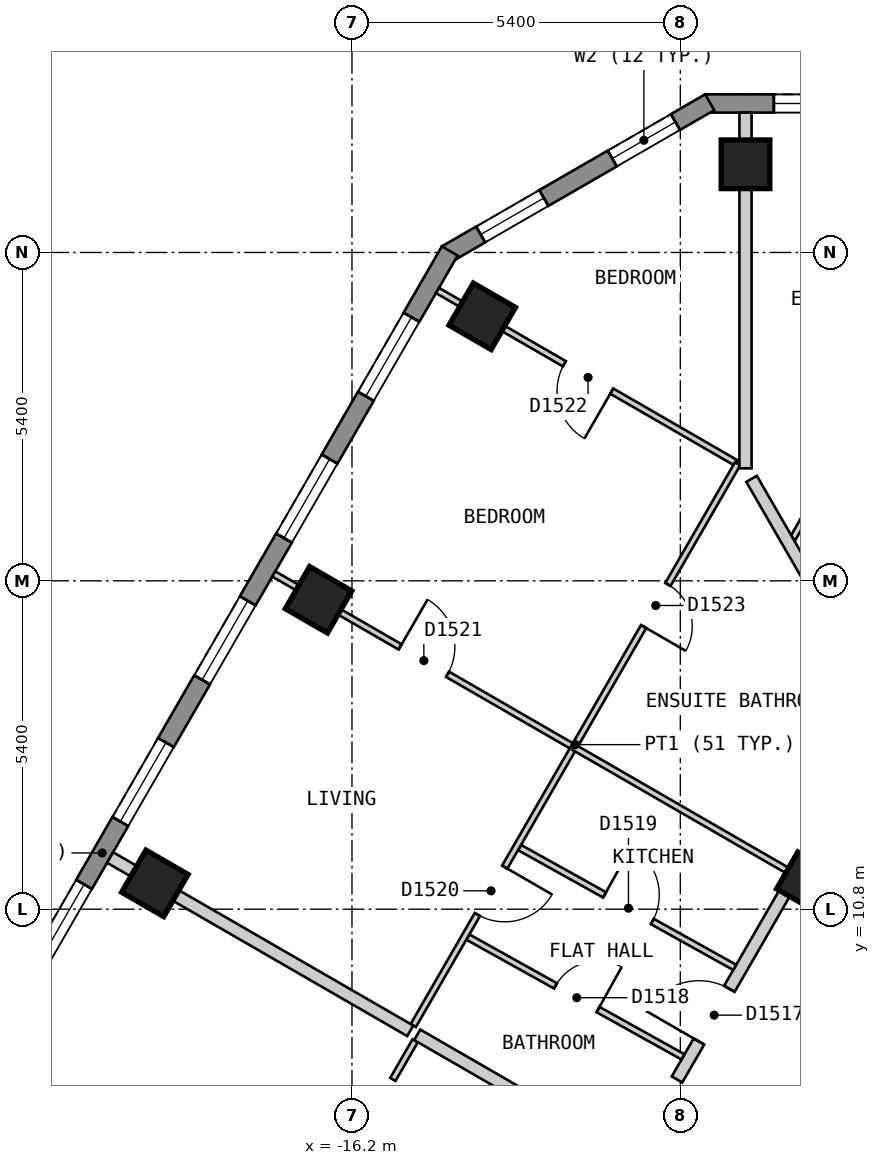
"""IFC4 building model, lengths in metres.
Left out: names, types, materials, properties, quantities, classifications, styles, units other than length and angle.
Written with IfcOpenShell. Run it as: python <this file> out.ifc"""

import sys

from ifc_helpers import new_model, si_unit, direction, frame, frame_2d, origin, origin_2d, place, context, subcontext, project, spatial, polyline, rectangle, outline, extrude, element, fill, save


model = new_model("IFC4")
c1 = context("Model", 3, precision=1e-05, world=origin(), true_north=direction((0.0, 1.0)))
c2 = subcontext(c1, "Body", "Model", "MODEL_VIEW")
j1 = project(units=[si_unit("LENGTHUNIT", "METRE"), si_unit("PLANEANGLEUNIT", "RADIAN")], contexts=[c1])
p1 = place(None, origin())
s1 = spatial("IfcSite", under=j1, at=p1, CompositionType="ELEMENT")
p2 = place(p1, origin())
s2 = spatial("IfcBuilding", under=s1, at=p2, CompositionType="ELEMENT")
p3 = place(p2, frame((0.0, 0.0, 184.2)))
s3 = spatial("IfcBuildingStorey", under=s2, at=p3, CompositionType="ELEMENT", Elevation=184.2)
for number, where, z_axis, x_axis in (
    (1, (-9.728, 23.05, 0.0), (0.0, 0.0, 1.0), (-1.0, 0.0, 0.0)),
    (2, (-14.058, 20.55, 0.0), (0.0, 0.0, 1.0), (-0.5, -0.866, 0.0)),
    (3, (-16.75, 15.888, 0.0), (0.0, 0.0, 1.0), (-0.5, -0.866, 0.0)),
    (4, (-19.442, 11.225, 0.0), (0.0, 0.0, 1.0), (-0.5, -0.866, 0.0)),
):
    element("IfcColumn", number, at=place(p3, frame(where, z_axis=z_axis, x_axis=x_axis)), inside=s3, PredefinedType="COLUMN", context=c2, shape_type="SweptSolid", body=[
        extrude(rectangle(XDim=0.8, YDim=0.8, at=origin_2d()), origin(), (0.0, 0.0, 1.0), 3.0),
    ])
p4 = place(p3, frame((-8.739, 11.263, 0.0), z_axis=(0.0, 0.0, 1.0), x_axis=(-0.5, -0.866025403784, 0.0)))
e5 = element("IfcColumn", 5, at=p4, inside=s3, PredefinedType="COLUMN", context=c2, shape_type="SweptSolid", body=[
    extrude(rectangle(XDim=0.7, YDim=0.7, at=origin_2d()), origin(), (0.0, 0.0, 1.0), 3.0),
])
p5 = place(p3, frame((10.392, 24.05, 0.0), z_axis=(0.0, 0.0, 1.0), x_axis=(-1.0, 0.0, 0.0)))
e6 = element("IfcWall", 6, at=p5, inside=s3, PredefinedType="SOLIDWALL", context=c2, shape_type="SweptSolid", body=[
    extrude(outline(polyline([(0.0, -0.15), (20.784, -0.15), (20.704, 0.15), (0.08, 0.15), (0.0, -0.15)])), origin(), (0.0, 0.0, 1.0), 2.7),
])
p6 = place(p5, frame((1.13, 0.0, 0.15)))
e7 = element("IfcOpeningElement", 7, at=p6, cuts=e6, PredefinedType="OPENING", context=c2, shape_type="SweptSolid", body=[
    extrude(rectangle(XDim=1.5, YDim=2.1, at=frame_2d((0.75, 1.05))), frame((0.0, 0.16, 0.0), z_axis=(0.0, -1.0, 0.0), x_axis=(1.0, 0.0, 0.0)), (0.0, 0.0, 1.0), 0.32),
])
p7 = place(p5, frame((3.562, 0.0, 0.15)))
e8 = element("IfcOpeningElement", 8, at=p7, cuts=e6, PredefinedType="OPENING", context=c2, shape_type="SweptSolid", body=[
    extrude(rectangle(XDim=1.5, YDim=2.1, at=frame_2d((0.75, 1.05))), frame((0.0, 0.16, 0.0), z_axis=(0.0, -1.0, 0.0), x_axis=(1.0, 0.0, 0.0)), (0.0, 0.0, 1.0), 0.32),
])
p8 = place(p5, frame((5.994, 0.0, 0.15)))
e9 = element("IfcOpeningElement", 9, at=p8, cuts=e6, PredefinedType="OPENING", context=c2, shape_type="SweptSolid", body=[
    extrude(rectangle(XDim=1.5, YDim=2.1, at=frame_2d((0.75, 1.05))), frame((0.0, 0.16, 0.0), z_axis=(0.0, -1.0, 0.0), x_axis=(1.0, 0.0, 0.0)), (0.0, 0.0, 1.0), 0.32),
])
p9 = place(p5, frame((8.426, 0.0, 0.15)))
e10 = element("IfcOpeningElement", 10, at=p9, cuts=e6, PredefinedType="OPENING", context=c2, shape_type="SweptSolid", body=[
    extrude(rectangle(XDim=1.5, YDim=2.1, at=frame_2d((0.75, 1.05))), frame((0.0, 0.16, 0.0), z_axis=(0.0, -1.0, 0.0), x_axis=(1.0, 0.0, 0.0)), (0.0, 0.0, 1.0), 0.32),
])
p10 = place(p5, frame((10.858, 0.0, 0.15)))
e11 = element("IfcOpeningElement", 11, at=p10, cuts=e6, PredefinedType="OPENING", context=c2, shape_type="SweptSolid", body=[
    extrude(rectangle(XDim=1.5, YDim=2.1, at=frame_2d((0.75, 1.05))), frame((0.0, 0.16, 0.0), z_axis=(0.0, -1.0, 0.0), x_axis=(1.0, 0.0, 0.0)), (0.0, 0.0, 1.0), 0.32),
])
p11 = place(p5, frame((13.29, 0.0, 0.15)))
e12 = element("IfcOpeningElement", 12, at=p11, cuts=e6, PredefinedType="OPENING", context=c2, shape_type="SweptSolid", body=[
    extrude(rectangle(XDim=1.5, YDim=2.1, at=frame_2d((0.75, 1.05))), frame((0.0, 0.16, 0.0), z_axis=(0.0, -1.0, 0.0), x_axis=(1.0, 0.0, 0.0)), (0.0, 0.0, 1.0), 0.32),
])
p12 = place(p5, frame((15.722, 0.0, 0.15)))
e13 = element("IfcOpeningElement", 13, at=p12, cuts=e6, PredefinedType="OPENING", context=c2, shape_type="SweptSolid", body=[
    extrude(rectangle(XDim=1.5, YDim=2.1, at=frame_2d((0.75, 1.05))), frame((0.0, 0.16, 0.0), z_axis=(0.0, -1.0, 0.0), x_axis=(1.0, 0.0, 0.0)), (0.0, 0.0, 1.0), 0.32),
])
p13 = place(p5, frame((18.154, 0.0, 0.15)))
e14 = element("IfcOpeningElement", 14, at=p13, cuts=e6, PredefinedType="OPENING", context=c2, shape_type="SweptSolid", body=[
    extrude(rectangle(XDim=1.5, YDim=2.1, at=frame_2d((0.75, 1.05))), frame((0.0, 0.16, 0.0), z_axis=(0.0, -1.0, 0.0), x_axis=(1.0, 0.0, 0.0)), (0.0, 0.0, 1.0), 0.32),
])
p14 = place(p3, frame((-10.317, 24.07, 0.0), z_axis=(0.0, 0.0, 1.0), x_axis=(-0.866022959057, -0.500004234368, 0.0)))
e15 = element("IfcWall", 15, at=p14, inside=s3, PredefinedType="SOLIDWALL", context=c2, shape_type="SweptSolid", body=[
    extrude(outline(polyline([(0.0, -0.15), (5.0, -0.15), (4.92, 0.15), (0.08, 0.15), (0.0, -0.15)])), origin(), (0.0, 0.0, 1.0), 2.7),
])
p15 = place(p14, frame((0.65, 0.0, 0.15)))
e16 = element("IfcOpeningElement", 16, at=p15, cuts=e15, PredefinedType="OPENING", context=c2, shape_type="SweptSolid", body=[
    extrude(rectangle(XDim=1.2, YDim=2.1, at=frame_2d((0.6, 1.05))), frame((0.0, 0.16, 0.0), z_axis=(0.0, -1.0, 0.0), x_axis=(1.0, 0.0, 0.0)), (0.0, 0.0, 1.0), 0.32),
])
p16 = place(p14, frame((3.149, 0.0, 0.15)))
e17 = element("IfcOpeningElement", 17, at=p16, cuts=e15, PredefinedType="OPENING", context=c2, shape_type="SweptSolid", body=[
    extrude(rectangle(XDim=1.2, YDim=2.1, at=frame_2d((0.6, 1.05))), frame((0.0, 0.16, 0.0), z_axis=(0.0, -1.0, 0.0), x_axis=(1.0, 0.0, 0.0)), (0.0, 0.0, 1.0), 0.32),
])
p17 = place(p3, frame((-14.592, 21.625, 0.0), z_axis=(0.0, 0.0, 1.0), x_axis=(-0.500010537973, -0.866019319597, 0.0)))
e18 = element("IfcWall", 18, at=p17, inside=s3, PredefinedType="SOLIDWALL", context=c2, shape_type="SweptSolid", body=[
    extrude(outline(polyline([(0.0, -0.15), (22.863, -0.15), (22.783, 0.15), (0.08, 0.15), (0.0, -0.15)])), origin(), (0.0, 0.0, 1.0), 2.7),
])
p18 = place(p17, frame((1.259, 0.0, 0.15)))
e19 = element("IfcOpeningElement", 19, at=p18, cuts=e18, PredefinedType="OPENING", context=c2, shape_type="SweptSolid", body=[
    extrude(rectangle(XDim=1.5, YDim=2.1, at=frame_2d((0.75, 1.05))), frame((0.0, 0.16, 0.0), z_axis=(0.0, -1.0, 0.0), x_axis=(1.0, 0.0, 0.0)), (0.0, 0.0, 1.0), 0.32),
])
p19 = place(p17, frame((3.952, 0.0, 0.15)))
e20 = element("IfcOpeningElement", 20, at=p19, cuts=e18, PredefinedType="OPENING", context=c2, shape_type="SweptSolid", body=[
    extrude(rectangle(XDim=1.5, YDim=2.1, at=frame_2d((0.75, 1.05))), frame((0.0, 0.16, 0.0), z_axis=(0.0, -1.0, 0.0), x_axis=(1.0, 0.0, 0.0)), (0.0, 0.0, 1.0), 0.32),
])
p20 = place(p17, frame((6.644, 0.0, 0.15)))
e21 = element("IfcOpeningElement", 21, at=p20, cuts=e18, PredefinedType="OPENING", context=c2, shape_type="SweptSolid", body=[
    extrude(rectangle(XDim=1.5, YDim=2.1, at=frame_2d((0.75, 1.05))), frame((0.0, 0.16, 0.0), z_axis=(0.0, -1.0, 0.0), x_axis=(1.0, 0.0, 0.0)), (0.0, 0.0, 1.0), 0.32),
])
p21 = place(p17, frame((9.335, 0.0, 0.15)))
e22 = element("IfcOpeningElement", 22, at=p21, cuts=e18, PredefinedType="OPENING", context=c2, shape_type="SweptSolid", body=[
    extrude(rectangle(XDim=1.5, YDim=2.1, at=frame_2d((0.75, 1.05))), frame((0.0, 0.16, 0.0), z_axis=(0.0, -1.0, 0.0), x_axis=(1.0, 0.0, 0.0)), (0.0, 0.0, 1.0), 0.32),
])
p22 = place(p17, frame((12.028, 0.0, 0.15)))
e23 = element("IfcOpeningElement", 23, at=p22, cuts=e18, PredefinedType="OPENING", context=c2, shape_type="SweptSolid", body=[
    extrude(rectangle(XDim=1.5, YDim=2.1, at=frame_2d((0.75, 1.05))), frame((0.0, 0.16, 0.0), z_axis=(0.0, -1.0, 0.0), x_axis=(1.0, 0.0, 0.0)), (0.0, 0.0, 1.0), 0.32),
])
p23 = place(p17, frame((14.72, 0.0, 0.15)))
e24 = element("IfcOpeningElement", 24, at=p23, cuts=e18, PredefinedType="OPENING", context=c2, shape_type="SweptSolid", body=[
    extrude(rectangle(XDim=1.5, YDim=2.1, at=frame_2d((0.75, 1.05))), frame((0.0, 0.16, 0.0), z_axis=(0.0, -1.0, 0.0), x_axis=(1.0, 0.0, 0.0)), (0.0, 0.0, 1.0), 0.32),
])
p24 = place(p17, frame((17.411, 0.0, 0.15)))
e25 = element("IfcOpeningElement", 25, at=p24, cuts=e18, PredefinedType="OPENING", context=c2, shape_type="SweptSolid", body=[
    extrude(rectangle(XDim=1.5, YDim=2.1, at=frame_2d((0.75, 1.05))), frame((0.0, 0.16, 0.0), z_axis=(0.0, -1.0, 0.0), x_axis=(1.0, 0.0, 0.0)), (0.0, 0.0, 1.0), 0.32),
])
p25 = place(p17, frame((20.104, 0.0, 0.15)))
e26 = element("IfcOpeningElement", 26, at=p25, cuts=e18, PredefinedType="OPENING", context=c2, shape_type="SweptSolid", body=[
    extrude(rectangle(XDim=1.5, YDim=2.1, at=frame_2d((0.75, 1.05))), frame((0.0, 0.16, 0.0), z_axis=(0.0, -1.0, 0.0), x_axis=(1.0, 0.0, 0.0)), (0.0, 0.0, 1.0), 0.32),
])
p26 = place(p3, frame((-10.854, 8.0, 0.0), z_axis=(0.0, 0.0, 1.0), x_axis=(0.499997637144, 0.866026767976, 0.0)))
e27 = element("IfcWall", 27, at=p26, inside=s3, PredefinedType="PARTITIONING", context=c2, shape_type="SweptSolid", body=[
    extrude(rectangle(XDim=10.854, YDim=0.2, at=frame_2d((5.427, 0.0))), origin(), (0.0, 0.0, 1.0), 2.7),
])
p27 = place(p26, frame((0.721, 0.0, 0.0)))
e28 = element("IfcOpeningElement", 28, at=p27, cuts=e27, PredefinedType="OPENING", context=c2, shape_type="SweptSolid", body=[
    extrude(rectangle(XDim=1.0, YDim=2.1, at=frame_2d((0.5, 1.05))), frame((0.0, 0.11, 0.0), z_axis=(0.0, -1.0, 0.0), x_axis=(1.0, 0.0, 0.0)), (0.0, 0.0, 1.0), 0.22),
])
p28 = place(p3, frame((-13.444, 11.814, 0.0), z_axis=(0.0, 0.0, 1.0), x_axis=(0.873653620945, -0.486548405207, 0.0)))
e29 = element("IfcWall", 29, at=p28, inside=s3, PredefinedType="PARTITIONING", context=c2, shape_type="SweptSolid", body=[
    extrude(rectangle(XDim=4.051, YDim=0.1, at=frame_2d((2.025, 0.0))), origin(), (0.0, 0.0, 1.0), 2.7),
])
p29 = place(p28, frame((1.6, 0.0, 0.0)))
e30 = element("IfcOpeningElement", 30, at=p29, cuts=e29, PredefinedType="OPENING", context=c2, shape_type="SweptSolid", body=[
    extrude(rectangle(XDim=0.9, YDim=2.1, at=frame_2d((0.45, 1.05))), frame((0.0, 0.06, 0.0), z_axis=(0.0, -1.0, 0.0), x_axis=(1.0, 0.0, 0.0)), (0.0, 0.0, 1.0), 0.12),
])
p30 = place(p3, frame((-14.294, 10.342, 0.0), z_axis=(0.0, 0.0, 1.0), x_axis=(0.873582256032, -0.486676527013, 0.0)))
e31 = element("IfcWall", 31, at=p30, inside=s3, PredefinedType="PARTITIONING", context=c2, shape_type="SweptSolid", body=[
    extrude(rectangle(XDim=4.05, YDim=0.1, at=frame_2d((2.025, 0.0))), origin(), (0.0, 0.0, 1.0), 2.7),
])
p31 = place(p30, frame((1.65, 0.0, 0.0)))
e32 = element("IfcOpeningElement", 32, at=p31, cuts=e31, PredefinedType="OPENING", context=c2, shape_type="SweptSolid", body=[
    extrude(rectangle(XDim=0.8, YDim=2.1, at=frame_2d((0.4, 1.05))), frame((0.0, 0.06, 0.0), z_axis=(0.0, -1.0, 0.0), x_axis=(1.0, 0.0, 0.0)), (0.0, 0.0, 1.0), 0.12),
])
p32 = place(p3, frame((-17.486, 16.313, 0.0), z_axis=(0.0, 0.0, 1.0), x_axis=(0.866004402611, -0.500036373335, 0.0)))
e33 = element("IfcWall", 33, at=p32, inside=s3, PredefinedType="PARTITIONING", context=c2, shape_type="SweptSolid", body=[
    extrude(rectangle(XDim=5.7, YDim=0.1, at=frame_2d((2.85, 0.0))), origin(), (0.0, 0.0, 1.0), 2.7),
])
p33 = place(p32, frame((2.4, 0.0, 0.0)))
e34 = element("IfcOpeningElement", 34, at=p33, cuts=e33, PredefinedType="OPENING", context=c2, shape_type="SweptSolid", body=[
    extrude(rectangle(XDim=0.9, YDim=2.1, at=frame_2d((0.45, 1.05))), frame((0.0, 0.06, 0.0), z_axis=(0.0, -1.0, 0.0), x_axis=(1.0, 0.0, 0.0)), (0.0, 0.0, 1.0), 0.12),
])
p34 = place(p3, frame((-14.794, 20.975, 0.0), z_axis=(0.0, 0.0, 1.0), x_axis=(0.865989811779, -0.500061642096, 0.0)))
e35 = element("IfcWall", 35, at=p34, inside=s3, PredefinedType="PARTITIONING", context=c2, shape_type="SweptSolid", body=[
    extrude(rectangle(XDim=5.67, YDim=0.1, at=frame_2d((2.835, 0.0))), origin(), (0.0, 0.0, 1.0), 2.7),
])
p35 = place(p34, frame((2.41, 0.0, 0.0)))
e36 = element("IfcOpeningElement", 36, at=p35, cuts=e35, PredefinedType="OPENING", context=c2, shape_type="SweptSolid", body=[
    extrude(rectangle(XDim=0.9, YDim=2.1, at=frame_2d((0.45, 1.05))), frame((0.0, 0.06, 0.0), z_axis=(0.0, -1.0, 0.0), x_axis=(1.0, 0.0, 0.0)), (0.0, 0.0, 1.0), 0.12),
])
p36 = place(p3, frame((-8.949, 16.9, 0.0), z_axis=(0.0, 0.0, 1.0), x_axis=(0.499949850951, 0.866054355415, 0.0)))
e37 = element("IfcWall", 37, at=p36, inside=s3, PredefinedType="PARTITIONING", context=c2, shape_type="SweptSolid", body=[
    extrude(rectangle(XDim=3.811, YDim=0.1, at=frame_2d((1.905, 0.0))), origin(), (0.0, 0.0, 1.0), 2.7),
])
p37 = place(p36, frame((1.992, 0.0, 0.0)))
e38 = element("IfcOpeningElement", 38, at=p37, cuts=e37, PredefinedType="OPENING", context=c2, shape_type="SweptSolid", body=[
    extrude(rectangle(XDim=0.8, YDim=2.1, at=frame_2d((0.4, 1.05))), frame((0.0, 0.06, 0.0), z_axis=(0.0, -1.0, 0.0), x_axis=(1.0, 0.0, 0.0)), (0.0, 0.0, 1.0), 0.12),
])
p38 = place(p3, frame((-15.528, 8.0, 0.0), z_axis=(0.0, 0.0, 1.0), x_axis=(0.500421336976, 0.865782008071, 0.0)))
e39 = element("IfcWall", 39, at=p38, inside=s3, PredefinedType="PARTITIONING", context=c2, shape_type="SweptSolid", body=[
    extrude(rectangle(XDim=0.736, YDim=0.1, at=frame_2d((0.368, 0.0))), origin(), (0.0, 0.0, 1.0), 2.7),
])
p39 = place(p3, frame((-15.192, 8.887, 0.0), z_axis=(0.0, 0.0, 1.0), x_axis=(0.500028204665, 0.866009119201, 0.0)))
e40 = element("IfcWall", 40, at=p39, inside=s3, PredefinedType="PARTITIONING", context=c2, shape_type="SweptSolid", body=[
    extrude(rectangle(XDim=10.667, YDim=0.1, at=frame_2d((5.334, 0.0))), origin(), (0.0, 0.0, 1.0), 2.7),
])
p40 = place(p39, frame((2.108, 0.0, 0.0)))
e41 = element("IfcOpeningElement", 41, at=p40, cuts=e40, PredefinedType="OPENING", context=c2, shape_type="SweptSolid", body=[
    extrude(rectangle(XDim=0.9, YDim=2.1, at=frame_2d((0.45, 1.05))), frame((0.0, 0.06, 0.0), z_axis=(0.0, -1.0, 0.0), x_axis=(1.0, 0.0, 0.0)), (0.0, 0.0, 1.0), 0.12),
])
p41 = place(p39, frame((7.576, 0.0, 0.0)))
e42 = element("IfcOpeningElement", 42, at=p41, cuts=e40, PredefinedType="OPENING", context=c2, shape_type="SweptSolid", body=[
    extrude(rectangle(XDim=0.8, YDim=2.1, at=frame_2d((0.4, 1.05))), frame((0.0, 0.06, 0.0), z_axis=(0.0, -1.0, 0.0), x_axis=(1.0, 0.0, 0.0)), (0.0, 0.0, 1.0), 0.12),
])
p42 = place(p3, frame((-9.628, 17.877, 0.0), z_axis=(0.0, 0.0, 1.0), x_axis=(0.499890461358, -0.866088636713, 0.0)))
e43 = element("IfcWall", 43, at=p42, inside=s3, PredefinedType="PARTITIONING", context=c2, shape_type="SweptSolid", body=[
    extrude(rectangle(XDim=4.361, YDim=0.2, at=frame_2d((2.18, 0.0))), origin(), (0.0, 0.0, 1.0), 2.7),
])
p43 = place(p3, frame((-20.178, 11.65, 0.0), z_axis=(0.0, 0.0, 1.0), x_axis=(0.866022950691, -0.500004248858, 0.0)))
e44 = element("IfcWall", 44, at=p43, inside=s3, PredefinedType="PARTITIONING", context=c2, shape_type="SweptSolid", body=[
    extrude(rectangle(XDim=5.7, YDim=0.2, at=frame_2d((2.85, 0.0))), origin(), (0.0, 0.0, 1.0), 2.7),
])
p44 = place(p3, frame((-15.127, 8.734, 0.0), z_axis=(0.0, 0.0, 1.0), x_axis=(0.865984601828, -0.500070664403, 0.0)))
e45 = element("IfcWall", 45, at=p44, inside=s3, PredefinedType="PARTITIONING", context=c2, shape_type="SweptSolid", body=[
    extrude(rectangle(XDim=4.167, YDim=0.2, at=frame_2d((2.084, 0.0))), origin(), (0.0, 0.0, 1.0), 2.7),
])
p45 = place(p3, frame((-9.728, 18.05, 0.0), z_axis=(0.0, 0.0, 1.0), x_axis=(0.0, 1.0, 0.0)))
e46 = element("IfcWall", 46, at=p45, inside=s3, PredefinedType="PARTITIONING", context=c2, shape_type="SweptSolid", body=[
    extrude(rectangle(XDim=5.85, YDim=0.2, at=frame_2d((2.925, 0.0))), origin(), (0.0, 0.0, 1.0), 2.7),
])
p46 = place(p3, frame((-12.55, 13.463, 0.0), z_axis=(0.0, 0.0, 1.0), x_axis=(0.86606561423, -0.499930346997, 0.0)))
e47 = element("IfcWall", 47, at=p46, inside=s3, PredefinedType="PARTITIONING", context=c2, shape_type="SweptSolid", body=[
    extrude(rectangle(XDim=4.1, YDim=0.1, at=frame_2d((2.05, 0.0))), origin(), (0.0, 0.0, 1.0), 2.7),
])
p47 = place(p13, origin())
e48 = element("IfcWindow", 48, at=p47, inside=s3, PartitioningType="SINGLE_PANEL", PredefinedType="WINDOW", context=c2, shape_type="SweptSolid", body=[
    extrude(rectangle(XDim=1.5, YDim=2.1, at=frame_2d((0.75, 1.05))), frame((0.0, 0.03, 0.0), z_axis=(0.0, -1.0, 0.0), x_axis=(1.0, 0.0, 0.0)), (0.0, 0.0, 1.0), 0.06),
])
fill(e14, e48)
p48 = place(p15, origin())
e49 = element("IfcWindow", 49, at=p48, inside=s3, PartitioningType="SINGLE_PANEL", PredefinedType="WINDOW", context=c2, shape_type="SweptSolid", body=[
    extrude(rectangle(XDim=1.2, YDim=2.1, at=frame_2d((0.6, 1.05))), frame((0.0, 0.03, 0.0), z_axis=(0.0, -1.0, 0.0), x_axis=(1.0, 0.0, 0.0)), (0.0, 0.0, 1.0), 0.06),
])
fill(e16, e49)
p49 = place(p16, origin())
e50 = element("IfcWindow", 50, at=p49, inside=s3, PartitioningType="SINGLE_PANEL", PredefinedType="WINDOW", context=c2, shape_type="SweptSolid", body=[
    extrude(rectangle(XDim=1.2, YDim=2.1, at=frame_2d((0.6, 1.05))), frame((0.0, 0.03, 0.0), z_axis=(0.0, -1.0, 0.0), x_axis=(1.0, 0.0, 0.0)), (0.0, 0.0, 1.0), 0.06),
])
fill(e17, e50)
p50 = place(p18, origin())
e51 = element("IfcWindow", 51, at=p50, inside=s3, PartitioningType="SINGLE_PANEL", PredefinedType="WINDOW", context=c2, shape_type="SweptSolid", body=[
    extrude(rectangle(XDim=1.5, YDim=2.1, at=frame_2d((0.75, 1.05))), frame((0.0, 0.03, 0.0), z_axis=(0.0, -1.0, 0.0), x_axis=(1.0, 0.0, 0.0)), (0.0, 0.0, 1.0), 0.06),
])
fill(e19, e51)
p51 = place(p19, origin())
e52 = element("IfcWindow", 52, at=p51, inside=s3, PartitioningType="SINGLE_PANEL", PredefinedType="WINDOW", context=c2, shape_type="SweptSolid", body=[
    extrude(rectangle(XDim=1.5, YDim=2.1, at=frame_2d((0.75, 1.05))), frame((0.0, 0.03, 0.0), z_axis=(0.0, -1.0, 0.0), x_axis=(1.0, 0.0, 0.0)), (0.0, 0.0, 1.0), 0.06),
])
fill(e20, e52)
p52 = place(p20, origin())
e53 = element("IfcWindow", 53, at=p52, inside=s3, PartitioningType="SINGLE_PANEL", PredefinedType="WINDOW", context=c2, shape_type="SweptSolid", body=[
    extrude(rectangle(XDim=1.5, YDim=2.1, at=frame_2d((0.75, 1.05))), frame((0.0, 0.03, 0.0), z_axis=(0.0, -1.0, 0.0), x_axis=(1.0, 0.0, 0.0)), (0.0, 0.0, 1.0), 0.06),
])
fill(e21, e53)
p53 = place(p21, origin())
e54 = element("IfcWindow", 54, at=p53, inside=s3, PartitioningType="SINGLE_PANEL", PredefinedType="WINDOW", context=c2, shape_type="SweptSolid", body=[
    extrude(rectangle(XDim=1.5, YDim=2.1, at=frame_2d((0.75, 1.05))), frame((0.0, 0.03, 0.0), z_axis=(0.0, -1.0, 0.0), x_axis=(1.0, 0.0, 0.0)), (0.0, 0.0, 1.0), 0.06),
])
fill(e22, e54)
p54 = place(p22, origin())
e55 = element("IfcWindow", 55, at=p54, inside=s3, PartitioningType="SINGLE_PANEL", PredefinedType="WINDOW", context=c2, shape_type="SweptSolid", body=[
    extrude(rectangle(XDim=1.5, YDim=2.1, at=frame_2d((0.75, 1.05))), frame((0.0, 0.03, 0.0), z_axis=(0.0, -1.0, 0.0), x_axis=(1.0, 0.0, 0.0)), (0.0, 0.0, 1.0), 0.06),
])
fill(e23, e55)
p55 = place(p27, origin())
e56 = element("IfcDoor", 56, at=p55, inside=s3, OperationType="SINGLE_SWING_LEFT", PredefinedType="DOOR", context=c2, shape_type="SweptSolid", body=[
    extrude(rectangle(XDim=1.0, YDim=2.1, at=frame_2d((0.5, 1.05))), frame((0.0, 0.025, 0.0), z_axis=(0.0, -1.0, 0.0), x_axis=(1.0, 0.0, 0.0)), (0.0, 0.0, 1.0), 0.05),
])
fill(e28, e56)
p56 = place(p31, origin())
e57 = element("IfcDoor", 57, at=p56, inside=s3, OperationType="SINGLE_SWING_RIGHT", PredefinedType="DOOR", context=c2, shape_type="SweptSolid", body=[
    extrude(rectangle(XDim=0.8, YDim=2.1, at=frame_2d((0.4, 1.05))), frame((0.0, 0.025, 0.0), z_axis=(0.0, -1.0, 0.0), x_axis=(1.0, 0.0, 0.0)), (0.0, 0.0, 1.0), 0.05),
])
fill(e32, e57)
p57 = place(p29, origin())
e58 = element("IfcDoor", 58, at=p57, inside=s3, OperationType="SINGLE_SWING_LEFT", PredefinedType="DOOR", context=c2, shape_type="SweptSolid", body=[
    extrude(rectangle(XDim=0.9, YDim=2.1, at=frame_2d((0.45, 1.05))), frame((0.0, 0.025, 0.0), z_axis=(0.0, -1.0, 0.0), x_axis=(1.0, 0.0, 0.0)), (0.0, 0.0, 1.0), 0.05),
])
fill(e30, e58)
p58 = place(p40, origin())
e59 = element("IfcDoor", 59, at=p58, inside=s3, OperationType="SINGLE_SWING_RIGHT", PredefinedType="DOOR", context=c2, shape_type="SweptSolid", body=[
    extrude(rectangle(XDim=0.9, YDim=2.1, at=frame_2d((0.45, 1.05))), frame((0.0, 0.025, 0.0), z_axis=(0.0, -1.0, 0.0), x_axis=(1.0, 0.0, 0.0)), (0.0, 0.0, 1.0), 0.05),
])
fill(e41, e59)
p59 = place(p33, origin())
e60 = element("IfcDoor", 60, at=p59, inside=s3, OperationType="SINGLE_SWING_LEFT", PredefinedType="DOOR", context=c2, shape_type="SweptSolid", body=[
    extrude(rectangle(XDim=0.9, YDim=2.1, at=frame_2d((0.45, 1.05))), frame((0.0, 0.025, 0.0), z_axis=(0.0, -1.0, 0.0), x_axis=(1.0, 0.0, 0.0)), (0.0, 0.0, 1.0), 0.05),
])
fill(e34, e60)
p60 = place(p35, origin())
e61 = element("IfcDoor", 61, at=p60, inside=s3, OperationType="SINGLE_SWING_RIGHT", PredefinedType="DOOR", context=c2, shape_type="SweptSolid", body=[
    extrude(rectangle(XDim=0.9, YDim=2.1, at=frame_2d((0.45, 1.05))), frame((0.0, 0.025, 0.0), z_axis=(0.0, -1.0, 0.0), x_axis=(1.0, 0.0, 0.0)), (0.0, 0.0, 1.0), 0.05),
])
fill(e36, e61)
p61 = place(p41, origin())
e62 = element("IfcDoor", 62, at=p61, inside=s3, OperationType="SINGLE_SWING_LEFT", PredefinedType="DOOR", context=c2, shape_type="SweptSolid", body=[
    extrude(rectangle(XDim=0.8, YDim=2.1, at=frame_2d((0.4, 1.05))), frame((0.0, 0.025, 0.0), z_axis=(0.0, -1.0, 0.0), x_axis=(1.0, 0.0, 0.0)), (0.0, 0.0, 1.0), 0.05),
])
fill(e42, e62)
save(model, sys.argv[1])
